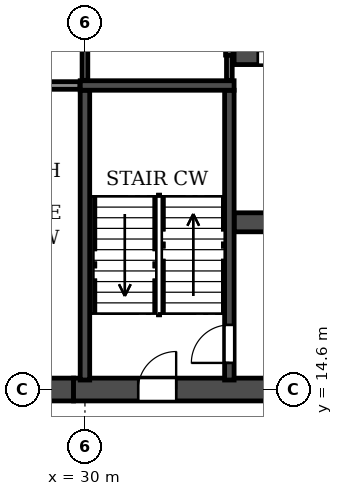
"""IFC4 building model, lengths in metres.
Left out: names, types, materials, properties, quantities, classifications, styles, units other than length and angle.
Written with IfcOpenShell. Run it as: python <this file> out.ifc"""

import sys

from ifc_helpers import new_model, si_unit, direction, frame, frame_2d, origin, place, context, subcontext, project, spatial, rectangle, extrude, element, fill, save


model = new_model("IFC4")
c1 = context("Model", 3, precision=1e-05, world=origin(), true_north=direction((0.0, 1.0)))
c2 = subcontext(c1, "Body", "Model", "MODEL_VIEW")
j1 = project(units=[si_unit("LENGTHUNIT", "METRE"), si_unit("PLANEANGLEUNIT", "RADIAN")], contexts=[c1])
p1 = place(None, origin())
s1 = spatial("IfcSite", under=j1, at=p1, CompositionType="ELEMENT")
p2 = place(p1, origin())
s2 = spatial("IfcBuilding", under=s1, at=p2, CompositionType="ELEMENT")
p3 = place(p2, frame((0.0, 0.0, 115.8)))
s3 = spatial("IfcBuildingStorey", under=s2, at=p3, CompositionType="ELEMENT", Elevation=115.8)
p4 = place(p3, frame((24.9, 14.6, 0.0), z_axis=(0.0, 0.0, 1.0), x_axis=(1.0, 0.0, 0.0)))
e1 = element("IfcWall", 1, at=p4, inside=s3, PredefinedType="SHEAR", context=c2, shape_type="SweptSolid", body=[
    extrude(rectangle(XDim=4.8, YDim=0.6, at=frame_2d((2.4, 0.0))), origin(), (0.0, 0.0, 1.0), 6.37),
])
p5 = place(p4, frame((1.9, 0.0, 0.0)))
e2 = element("IfcOpeningElement", 2, at=p5, cuts=e1, PredefinedType="OPENING", context=c2, shape_type="SweptSolid", body=[
    extrude(rectangle(XDim=1.0, YDim=2.1, at=frame_2d((0.5, 1.05))), frame((0.0, 0.31, 0.0), z_axis=(0.0, -1.0, 0.0), x_axis=(1.0, 0.0, 0.0)), (0.0, 0.0, 1.0), 0.62),
])
p6 = place(p3, frame((29.7, 14.6, 0.0), z_axis=(0.0, 0.0, 1.0), x_axis=(1.0, 0.0, 0.0)))
e3 = element("IfcWall", 3, at=p6, inside=s3, PredefinedType="SOLIDWALL", context=c2, shape_type="SweptSolid", body=[
    extrude(rectangle(XDim=42.6, YDim=0.6, at=frame_2d((21.3, 0.0))), origin(), (0.0, 0.0, 1.0), 6.37),
])
p7 = place(p6, frame((1.7, 0.0, 0.0)))
e4 = element("IfcOpeningElement", 4, at=p7, cuts=e3, PredefinedType="OPENING", context=c2, shape_type="SweptSolid", body=[
    extrude(rectangle(XDim=1.0, YDim=2.1, at=frame_2d((0.5, 1.05))), frame((0.0, 0.31, 0.0), z_axis=(0.0, -1.0, 0.0), x_axis=(1.0, 0.0, 0.0)), (0.0, 0.0, 1.0), 0.62),
])
p8 = place(p6, frame((14.3, 0.0, 0.0)))
e5 = element("IfcOpeningElement", 5, at=p8, cuts=e3, PredefinedType="OPENING", context=c2, shape_type="SweptSolid", body=[
    extrude(rectangle(XDim=1.0, YDim=2.1, at=frame_2d((0.5, 1.05))), frame((0.0, 0.31, 0.0), z_axis=(0.0, -1.0, 0.0), x_axis=(1.0, 0.0, 0.0)), (0.0, 0.0, 1.0), 0.62),
])
p9 = place(p6, frame((18.2, 0.0, 0.0)))
e6 = element("IfcOpeningElement", 6, at=p9, cuts=e3, PredefinedType="OPENING", context=c2, shape_type="SweptSolid", body=[
    extrude(rectangle(XDim=1.0, YDim=2.1, at=frame_2d((0.5, 1.05))), frame((0.0, 0.31, 0.0), z_axis=(0.0, -1.0, 0.0), x_axis=(1.0, 0.0, 0.0)), (0.0, 0.0, 1.0), 0.62),
])
p10 = place(p6, frame((20.8, 0.0, 0.0)))
e7 = element("IfcOpeningElement", 7, at=p10, cuts=e3, PredefinedType="OPENING", context=c2, shape_type="SweptSolid", body=[
    extrude(rectangle(XDim=1.0, YDim=2.1, at=frame_2d((0.5, 1.05))), frame((0.0, 0.31, 0.0), z_axis=(0.0, -1.0, 0.0), x_axis=(1.0, 0.0, 0.0)), (0.0, 0.0, 1.0), 0.62),
])
p11 = place(p6, frame((26.0, 0.0, 0.0)))
e8 = element("IfcOpeningElement", 8, at=p11, cuts=e3, PredefinedType="OPENING", context=c2, shape_type="SweptSolid", body=[
    extrude(rectangle(XDim=1.0, YDim=2.1, at=frame_2d((0.5, 1.05))), frame((0.0, 0.31, 0.0), z_axis=(0.0, -1.0, 0.0), x_axis=(1.0, 0.0, 0.0)), (0.0, 0.0, 1.0), 0.62),
])
p12 = place(p6, frame((39.9, 0.0, 0.0)))
e9 = element("IfcOpeningElement", 9, at=p12, cuts=e3, PredefinedType="OPENING", context=c2, shape_type="SweptSolid", body=[
    extrude(rectangle(XDim=1.0, YDim=2.1, at=frame_2d((0.5, 1.05))), frame((0.0, 0.31, 0.0), z_axis=(0.0, -1.0, 0.0), x_axis=(1.0, 0.0, 0.0)), (0.0, 0.0, 1.0), 0.62),
])
p13 = place(p3, frame((33.925, 19.0, 0.0), z_axis=(0.0, 0.0, 1.0), x_axis=(1.0, 0.0, 0.0)))
e10 = element("IfcWall", 10, at=p13, inside=s3, PredefinedType="SOLIDWALL", context=c2, shape_type="SweptSolid", body=[
    extrude(rectangle(XDim=34.15, YDim=0.5, at=frame_2d((17.075, 0.0))), origin(), (0.0, 0.0, 1.0), 6.37),
])
p14 = place(p13, frame((16.175, 0.0, 0.0)))
e11 = element("IfcOpeningElement", 11, at=p14, cuts=e10, PredefinedType="OPENING", context=c2, shape_type="SweptSolid", body=[
    extrude(rectangle(XDim=1.8, YDim=2.1, at=frame_2d((0.9, 1.05))), frame((0.0, 0.26, 0.0), z_axis=(0.0, -1.0, 0.0), x_axis=(1.0, 0.0, 0.0)), (0.0, 0.0, 1.0), 0.52),
])
p15 = place(p13, frame((1.525, 0.0, 0.0)))
e12 = element("IfcOpeningElement", 12, at=p15, cuts=e10, PredefinedType="OPENING", context=c2, shape_type="SweptSolid", body=[
    extrude(rectangle(XDim=1.8, YDim=2.1, at=frame_2d((0.9, 1.05))), frame((0.0, 0.26, 0.0), z_axis=(0.0, -1.0, 0.0), x_axis=(1.0, 0.0, 0.0)), (0.0, 0.0, 1.0), 0.52),
])
p16 = place(p13, frame((30.825, 0.0, 0.0)))
e13 = element("IfcOpeningElement", 13, at=p16, cuts=e10, PredefinedType="OPENING", context=c2, shape_type="SweptSolid", body=[
    extrude(rectangle(XDim=1.8, YDim=2.1, at=frame_2d((0.9, 1.05))), frame((0.0, 0.26, 0.0), z_axis=(0.0, -1.0, 0.0), x_axis=(1.0, 0.0, 0.0)), (0.0, 0.0, 1.0), 0.52),
])
p17 = place(p3, frame((33.925, 23.4, 0.0), z_axis=(0.0, 0.0, 1.0), x_axis=(1.0, 0.0, 0.0)))
e14 = element("IfcWall", 14, at=p17, inside=s3, PredefinedType="SOLIDWALL", context=c2, shape_type="SweptSolid", body=[
    extrude(rectangle(XDim=34.15, YDim=0.5, at=frame_2d((17.075, 0.0))), origin(), (0.0, 0.0, 1.0), 6.37),
])
p18 = place(p17, frame((16.175, 0.0, 0.0)))
e15 = element("IfcOpeningElement", 15, at=p18, cuts=e14, PredefinedType="OPENING", context=c2, shape_type="SweptSolid", body=[
    extrude(rectangle(XDim=1.8, YDim=2.1, at=frame_2d((0.9, 1.05))), frame((0.0, 0.26, 0.0), z_axis=(0.0, -1.0, 0.0), x_axis=(1.0, 0.0, 0.0)), (0.0, 0.0, 1.0), 0.52),
])
p19 = place(p17, frame((0.625, 0.0, 0.0)))
e16 = element("IfcOpeningElement", 16, at=p19, cuts=e14, PredefinedType="OPENING", context=c2, shape_type="SweptSolid", body=[
    extrude(rectangle(XDim=1.1, YDim=2.1, at=frame_2d((0.55, 1.05))), frame((0.0, 0.26, 0.0), z_axis=(0.0, -1.0, 0.0), x_axis=(1.0, 0.0, 0.0)), (0.0, 0.0, 1.0), 0.52),
])
p20 = place(p17, frame((3.225, 0.0, 0.0)))
e17 = element("IfcOpeningElement", 17, at=p20, cuts=e14, PredefinedType="OPENING", context=c2, shape_type="SweptSolid", body=[
    extrude(rectangle(XDim=1.1, YDim=2.1, at=frame_2d((0.55, 1.05))), frame((0.0, 0.26, 0.0), z_axis=(0.0, -1.0, 0.0), x_axis=(1.0, 0.0, 0.0)), (0.0, 0.0, 1.0), 0.52),
])
p21 = place(p17, frame((5.825, 0.0, 0.0)))
e18 = element("IfcOpeningElement", 18, at=p21, cuts=e14, PredefinedType="OPENING", context=c2, shape_type="SweptSolid", body=[
    extrude(rectangle(XDim=1.1, YDim=2.1, at=frame_2d((0.55, 1.05))), frame((0.0, 0.26, 0.0), z_axis=(0.0, -1.0, 0.0), x_axis=(1.0, 0.0, 0.0)), (0.0, 0.0, 1.0), 0.52),
])
p22 = place(p17, frame((8.425, 0.0, 0.0)))
e19 = element("IfcOpeningElement", 19, at=p22, cuts=e14, PredefinedType="OPENING", context=c2, shape_type="SweptSolid", body=[
    extrude(rectangle(XDim=1.1, YDim=2.1, at=frame_2d((0.55, 1.05))), frame((0.0, 0.26, 0.0), z_axis=(0.0, -1.0, 0.0), x_axis=(1.0, 0.0, 0.0)), (0.0, 0.0, 1.0), 0.52),
])
p23 = place(p17, frame((11.025, 0.0, 0.0)))
e20 = element("IfcOpeningElement", 20, at=p23, cuts=e14, PredefinedType="OPENING", context=c2, shape_type="SweptSolid", body=[
    extrude(rectangle(XDim=1.1, YDim=2.1, at=frame_2d((0.55, 1.05))), frame((0.0, 0.26, 0.0), z_axis=(0.0, -1.0, 0.0), x_axis=(1.0, 0.0, 0.0)), (0.0, 0.0, 1.0), 0.52),
])
p24 = place(p17, frame((13.625, 0.0, 0.0)))
e21 = element("IfcOpeningElement", 21, at=p24, cuts=e14, PredefinedType="OPENING", context=c2, shape_type="SweptSolid", body=[
    extrude(rectangle(XDim=1.1, YDim=2.1, at=frame_2d((0.55, 1.05))), frame((0.0, 0.26, 0.0), z_axis=(0.0, -1.0, 0.0), x_axis=(1.0, 0.0, 0.0)), (0.0, 0.0, 1.0), 0.52),
])
p25 = place(p17, frame((19.425, 0.0, 0.0)))
e22 = element("IfcOpeningElement", 22, at=p25, cuts=e14, PredefinedType="OPENING", context=c2, shape_type="SweptSolid", body=[
    extrude(rectangle(XDim=1.1, YDim=2.1, at=frame_2d((0.55, 1.05))), frame((0.0, 0.26, 0.0), z_axis=(0.0, -1.0, 0.0), x_axis=(1.0, 0.0, 0.0)), (0.0, 0.0, 1.0), 0.52),
])
p26 = place(p17, frame((22.025, 0.0, 0.0)))
e23 = element("IfcOpeningElement", 23, at=p26, cuts=e14, PredefinedType="OPENING", context=c2, shape_type="SweptSolid", body=[
    extrude(rectangle(XDim=1.1, YDim=2.1, at=frame_2d((0.55, 1.05))), frame((0.0, 0.26, 0.0), z_axis=(0.0, -1.0, 0.0), x_axis=(1.0, 0.0, 0.0)), (0.0, 0.0, 1.0), 0.52),
])
p27 = place(p17, frame((27.225, 0.0, 0.0)))
e24 = element("IfcOpeningElement", 24, at=p27, cuts=e14, PredefinedType="OPENING", context=c2, shape_type="SweptSolid", body=[
    extrude(rectangle(XDim=1.1, YDim=2.1, at=frame_2d((0.55, 1.05))), frame((0.0, 0.26, 0.0), z_axis=(0.0, -1.0, 0.0), x_axis=(1.0, 0.0, 0.0)), (0.0, 0.0, 1.0), 0.52),
])
p28 = place(p3, frame((30.0, 14.85, 0.0), z_axis=(0.0, 0.0, 1.0), x_axis=(0.0, 1.0, 0.0)))
e25 = element("IfcWall", 25, at=p28, inside=s3, PredefinedType="SOLIDWALL", context=c2, shape_type="SweptSolid", body=[
    extrude(rectangle(XDim=7.625, YDim=0.25, at=frame_2d((3.812, 0.0))), origin(), (0.0, 0.0, 1.0), 6.37),
])
p29 = place(p3, frame((33.8, 14.85, 0.0), z_axis=(0.0, 0.0, 1.0), x_axis=(0.0, 1.0, 0.0)))
e26 = element("IfcWall", 26, at=p29, inside=s3, PredefinedType="SOLIDWALL", context=c2, shape_type="SweptSolid", body=[
    extrude(rectangle(XDim=7.625, YDim=0.25, at=frame_2d((3.812, 0.0))), origin(), (0.0, 0.0, 1.0), 6.37),
])
p30 = place(p29, frame((0.45, 0.0, 0.0)))
e27 = element("IfcOpeningElement", 27, at=p30, cuts=e26, PredefinedType="OPENING", context=c2, shape_type="SweptSolid", body=[
    extrude(rectangle(XDim=1.0, YDim=2.1, at=frame_2d((0.5, 1.05))), frame((0.0, 0.135, 0.0), z_axis=(0.0, -1.0, 0.0), x_axis=(1.0, 0.0, 0.0)), (0.0, 0.0, 1.0), 0.27),
])
p31 = place(p3, frame((29.875, 22.6, 0.0), z_axis=(0.0, 0.0, 1.0), x_axis=(1.0, 0.0, 0.0)))
e28 = element("IfcWall", 28, at=p31, inside=s3, PredefinedType="SOLIDWALL", context=c2, shape_type="SweptSolid", body=[
    extrude(rectangle(XDim=4.05, YDim=0.25, at=frame_2d((2.025, 0.0))), origin(), (0.0, 0.0, 1.0), 6.37),
])
p32 = place(p3, frame((24.735, 22.6, 0.0), z_axis=(0.0, 0.0, 1.0), x_axis=(1.0, 0.0, 0.0)))
e29 = element("IfcWall", 29, at=p32, inside=s3, PredefinedType="PARTITIONING", context=c2, shape_type="SweptSolid", body=[
    extrude(rectangle(XDim=5.13, YDim=0.2, at=frame_2d((2.565, 0.0))), origin(), (0.0, 0.0, 1.0), 6.37),
])
p33 = place(p3, frame((30.0, 22.735, 0.0), z_axis=(0.0, 0.0, 1.0), x_axis=(0.0, 1.0, 0.0)))
e30 = element("IfcWall", 30, at=p33, inside=s3, PredefinedType="PARTITIONING", context=c2, shape_type="SweptSolid", body=[
    extrude(rectangle(XDim=4.755, YDim=0.15, at=frame_2d((2.377, 0.0))), origin(), (0.0, 0.0, 1.0), 6.37),
])
p34 = place(p3, frame((33.8, 22.735, 0.0), z_axis=(0.0, 0.0, 1.0), x_axis=(0.0, 1.0, 0.0)))
e31 = element("IfcWall", 31, at=p34, inside=s3, PredefinedType="PARTITIONING", context=c2, shape_type="SweptSolid", body=[
    extrude(rectangle(XDim=0.665, YDim=0.15, at=frame_2d((0.333, 0.0))), origin(), (0.0, 0.0, 1.0), 6.37),
])
p35 = place(p3, frame((33.8, 23.4, 0.0), z_axis=(0.0, 0.0, 1.0), x_axis=(0.0, 1.0, 0.0)))
e32 = element("IfcWall", 32, at=p35, inside=s3, PredefinedType="PARTITIONING", context=c2, shape_type="SweptSolid", body=[
    extrude(rectangle(XDim=2.7, YDim=0.2, at=frame_2d((1.35, 0.0))), origin(), (0.0, 0.0, 1.0), 6.37),
])
p36 = place(p7, origin())
e33 = element("IfcDoor", 33, at=p36, inside=s3, OperationType="SINGLE_SWING_RIGHT", PredefinedType="DOOR", context=c2, shape_type="SweptSolid", body=[
    extrude(rectangle(XDim=1.0, YDim=2.1, at=frame_2d((0.5, 1.05))), frame((0.0, 0.025, 0.0), z_axis=(0.0, -1.0, 0.0), x_axis=(1.0, 0.0, 0.0)), (0.0, 0.0, 1.0), 0.05),
])
fill(e4, e33)
p37 = place(p30, origin())
e34 = element("IfcDoor", 34, at=p37, inside=s3, OperationType="SINGLE_SWING_LEFT", PredefinedType="DOOR", context=c2, shape_type="SweptSolid", body=[
    extrude(rectangle(XDim=1.0, YDim=2.1, at=frame_2d((0.5, 1.05))), frame((0.0, 0.025, 0.0), z_axis=(0.0, -1.0, 0.0), x_axis=(1.0, 0.0, 0.0)), (0.0, 0.0, 1.0), 0.05),
])
fill(e27, e34)
p38 = place(p19, origin())
e35 = element("IfcDoor", 35, at=p38, inside=s3, OperationType="DOUBLE_DOOR_SLIDING", PredefinedType="DOOR", context=c2, shape_type="SweptSolid", body=[
    extrude(rectangle(XDim=1.1, YDim=2.1, at=frame_2d((0.55, 1.05))), frame((0.0, 0.025, 0.0), z_axis=(0.0, -1.0, 0.0), x_axis=(1.0, 0.0, 0.0)), (0.0, 0.0, 1.0), 0.05),
])
fill(e16, e35)
save(model, sys.argv[1])
